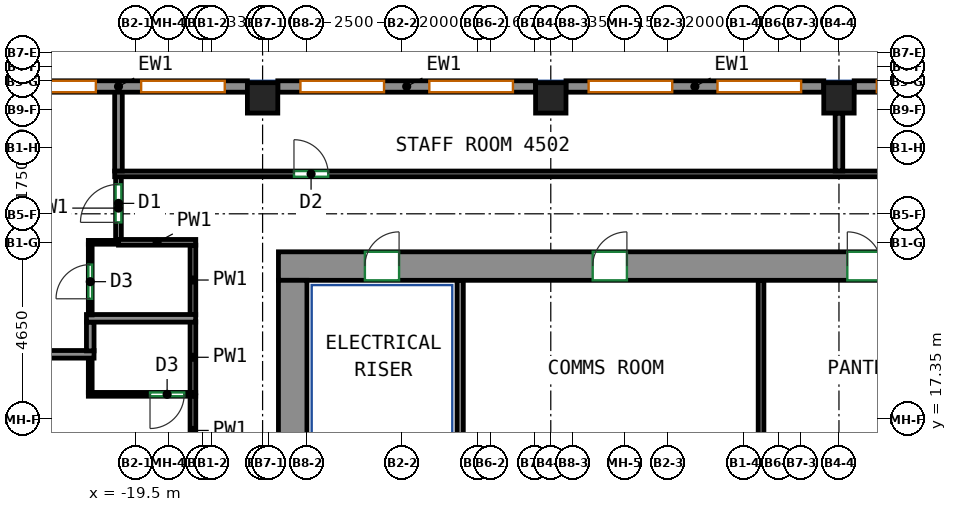
"""IFC4 building model, lengths in metres.
Left out: names, types, materials, properties, quantities, classifications, styles, units other than length and angle.
Written with IfcOpenShell. Run it as: python <this file> out.ifc"""

import sys

from ifc_helpers import new_model, si_unit, direction, frame, frame_2d, origin, origin_2d, place, context, subcontext, project, spatial, rectangle, extrude, source, transform, mapped, element, fill, save


model = new_model("IFC4")
c1 = context("Model", 3, precision=1e-05, world=origin(), true_north=direction((0.0, 1.0)))
c2 = subcontext(c1, "Body", "Model", "MODEL_VIEW")
j1 = project(units=[si_unit("LENGTHUNIT", "METRE"), si_unit("PLANEANGLEUNIT", "RADIAN")], contexts=[c1])
p1 = place(None, origin())
s1 = spatial("IfcSite", under=j1, at=p1, CompositionType="ELEMENT")
p2 = place(p1, origin())
s2 = spatial("IfcBuilding", under=s1, at=p2, CompositionType="ELEMENT")
p3 = place(p2, frame((0.0, 0.0, 188.9)))
s3 = spatial("IfcBuildingStorey", under=s2, at=p3, CompositionType="ELEMENT", Elevation=188.9)
m1 = source(origin(), c2, "Body", "SweptSolid", [
    extrude(rectangle(XDim=0.8, YDim=0.8, at=origin_2d()), origin(), (0.0, 0.0, 1.0), 3.12),
])
for number, where, z_axis, x_axis in (
    (1, (-16.167, 25.8, 0.0), (0.0, 0.0, 1.0), (1.0, 0.0, 0.0)),
    (2, (-8.583, 25.8, 0.0), (0.0, 0.0, 1.0), (1.0, 0.0, 0.0)),
    (3, (-1.0, 25.8, 0.0), (0.0, 0.0, 1.0), (1.0, 0.0, 0.0)),
):
    element("IfcColumn", number, at=place(p3, frame(where, z_axis=z_axis, x_axis=x_axis)), inside=s3, PredefinedType="COLUMN", context=c2, shape_type="MappedRepresentation", body=[
        mapped(m1, transform((0.0, 0.0, 0.0))),
    ])
m2 = source(origin(), c2, "Body", "SweptSolid", [
    extrude(rectangle(XDim=33.6, YDim=0.75, at=frame_2d((16.8, 0.0))), origin(), (0.0, 0.0, 1.0), 3.12),
])
p4 = place(p3, frame((-15.75, 21.375, 0.0), z_axis=(0.0, 0.0, 1.0), x_axis=(1.0, 0.0, 0.0)))
e4 = element("IfcWall", 4, at=p4, inside=s3, PredefinedType="SHEAR", context=c2, shape_type="MappedRepresentation", body=[
    mapped(m2, transform((0.0, 0.0, 0.0))),
])
p5 = place(p4, frame((8.27, 0.0, 0.0)))
e5 = element("IfcOpeningElement", 5, at=p5, cuts=e4, PredefinedType="OPENING", context=c2, shape_type="SweptSolid", body=[
    extrude(rectangle(XDim=0.9, YDim=2.1, at=frame_2d((0.45, 1.05))), frame((0.0, 0.385, 0.0), z_axis=(0.0, -1.0, 0.0), x_axis=(1.0, 0.0, 0.0)), (0.0, 0.0, 1.0), 0.77),
])
p6 = place(p4, frame((14.97, 0.0, 0.0)))
e6 = element("IfcOpeningElement", 6, at=p6, cuts=e4, PredefinedType="OPENING", context=c2, shape_type="SweptSolid", body=[
    extrude(rectangle(XDim=0.9, YDim=2.1, at=frame_2d((0.45, 1.05))), frame((0.0, 0.385, 0.0), z_axis=(0.0, -1.0, 0.0), x_axis=(1.0, 0.0, 0.0)), (0.0, 0.0, 1.0), 0.77),
])
p7 = place(p4, frame((19.794, 0.0, 0.0)))
e7 = element("IfcOpeningElement", 7, at=p7, cuts=e4, PredefinedType="OPENING", context=c2, shape_type="SweptSolid", body=[
    extrude(rectangle(XDim=0.9, YDim=2.1, at=frame_2d((0.45, 1.05))), frame((0.0, 0.385, 0.0), z_axis=(0.0, -1.0, 0.0), x_axis=(1.0, 0.0, 0.0)), (0.0, 0.0, 1.0), 0.77),
])
p8 = place(p4, frame((25.154, 0.0, 0.0)))
e8 = element("IfcOpeningElement", 8, at=p8, cuts=e4, PredefinedType="OPENING", context=c2, shape_type="SweptSolid", body=[
    extrude(rectangle(XDim=0.9, YDim=2.1, at=frame_2d((0.45, 1.05))), frame((0.0, 0.385, 0.0), z_axis=(0.0, -1.0, 0.0), x_axis=(1.0, 0.0, 0.0)), (0.0, 0.0, 1.0), 0.77),
])
p9 = place(p4, frame((2.275, 0.0, 0.0)))
e9 = element("IfcOpeningElement", 9, at=p9, cuts=e4, PredefinedType="OPENING", context=c2, shape_type="SweptSolid", body=[
    extrude(rectangle(XDim=0.9, YDim=2.1, at=frame_2d((0.45, 1.05))), frame((0.0, 0.385, 0.0), z_axis=(0.0, -1.0, 0.0), x_axis=(1.0, 0.0, 0.0)), (0.0, 0.0, 1.0), 0.77),
])
p10 = place(p4, frame((30.425, 0.0, 0.0)))
e10 = element("IfcOpeningElement", 10, at=p10, cuts=e4, PredefinedType="OPENING", context=c2, shape_type="SweptSolid", body=[
    extrude(rectangle(XDim=0.9, YDim=2.1, at=frame_2d((0.45, 1.05))), frame((0.0, 0.385, 0.0), z_axis=(0.0, -1.0, 0.0), x_axis=(1.0, 0.0, 0.0)), (0.0, 0.0, 1.0), 0.77),
])
m3 = source(origin(), c2, "Body", "SweptSolid", [
    extrude(rectangle(XDim=12.0, YDim=0.75, at=frame_2d((6.0, 0.0))), origin(), (0.0, 0.0, 1.0), 3.12),
])
p11 = place(p3, frame((-15.375, 9.0, 0.0), z_axis=(0.0, 0.0, 1.0), x_axis=(0.0, 1.0, 0.0)))
e11 = element("IfcWall", 11, at=p11, inside=s3, PredefinedType="SHEAR", context=c2, shape_type="MappedRepresentation", body=[
    mapped(m3, transform((0.0, 0.0, 0.0))),
])
m4 = source(origin(), c2, "Body", "SweptSolid", [
    extrude(rectangle(XDim=6.783, YDim=0.3, at=frame_2d((3.392, 0.0))), origin(), (0.0, 0.0, 1.0), 3.12),
])
p12 = place(p3, frame((6.183, 26.1, 0.0), z_axis=(0.0, 0.0, 1.0), x_axis=(-1.0, 0.0, 0.0)))
e12 = element("IfcWall", 12, at=p12, inside=s3, PredefinedType="SOLIDWALL", context=c2, shape_type="MappedRepresentation", body=[
    mapped(m4, transform((0.0, 0.0, 0.0))),
])
p13 = place(p12, frame((0.596, 0.0, 0.85)))
e13 = element("IfcOpeningElement", 13, at=p13, cuts=e12, PredefinedType="OPENING", context=c2, shape_type="SweptSolid", body=[
    extrude(rectangle(XDim=2.2, YDim=1.95, at=frame_2d((1.1, 0.975))), frame((0.0, 0.16, 0.0), z_axis=(0.0, -1.0, 0.0), x_axis=(1.0, 0.0, 0.0)), (0.0, 0.0, 1.0), 0.32),
])
p14 = place(p12, frame((3.988, 0.0, 0.85)))
e14 = element("IfcOpeningElement", 14, at=p14, cuts=e12, PredefinedType="OPENING", context=c2, shape_type="SweptSolid", body=[
    extrude(rectangle(XDim=2.2, YDim=1.95, at=frame_2d((1.1, 0.975))), frame((0.0, 0.16, 0.0), z_axis=(0.0, -1.0, 0.0), x_axis=(1.0, 0.0, 0.0)), (0.0, 0.0, 1.0), 0.32),
])
p15 = place(p3, frame((-1.4, 26.1, 0.0), z_axis=(0.0, 0.0, 1.0), x_axis=(-1.0, 0.0, 0.0)))
e15 = element("IfcWall", 15, at=p15, inside=s3, PredefinedType="SOLIDWALL", context=c2, shape_type="MappedRepresentation", body=[
    mapped(m4, transform((0.0, 0.0, 0.0))),
])
p16 = place(p15, frame((0.596, 0.0, 0.85)))
e16 = element("IfcOpeningElement", 16, at=p16, cuts=e15, PredefinedType="OPENING", context=c2, shape_type="SweptSolid", body=[
    extrude(rectangle(XDim=2.2, YDim=1.95, at=frame_2d((1.1, 0.975))), frame((0.0, 0.16, 0.0), z_axis=(0.0, -1.0, 0.0), x_axis=(1.0, 0.0, 0.0)), (0.0, 0.0, 1.0), 0.32),
])
p17 = place(p15, frame((3.988, 0.0, 0.85)))
e17 = element("IfcOpeningElement", 17, at=p17, cuts=e15, PredefinedType="OPENING", context=c2, shape_type="SweptSolid", body=[
    extrude(rectangle(XDim=2.2, YDim=1.95, at=frame_2d((1.1, 0.975))), frame((0.0, 0.16, 0.0), z_axis=(0.0, -1.0, 0.0), x_axis=(1.0, 0.0, 0.0)), (0.0, 0.0, 1.0), 0.32),
])
m5 = source(origin(), c2, "Body", "SweptSolid", [
    extrude(rectangle(XDim=6.783, YDim=0.3, at=frame_2d((3.392, 0.0))), origin(), (0.0, 0.0, 1.0), 3.12),
])
p18 = place(p3, frame((-8.983, 26.1, 0.0), z_axis=(0.0, 0.0, 1.0), x_axis=(-1.0, 0.0, 0.0)))
e18 = element("IfcWall", 18, at=p18, inside=s3, PredefinedType="SOLIDWALL", context=c2, shape_type="MappedRepresentation", body=[
    mapped(m5, transform((0.0, 0.0, 0.0))),
])
p19 = place(p18, frame((0.596, 0.0, 0.85)))
e19 = element("IfcOpeningElement", 19, at=p19, cuts=e18, PredefinedType="OPENING", context=c2, shape_type="SweptSolid", body=[
    extrude(rectangle(XDim=2.2, YDim=1.95, at=frame_2d((1.1, 0.975))), frame((0.0, 0.16, 0.0), z_axis=(0.0, -1.0, 0.0), x_axis=(1.0, 0.0, 0.0)), (0.0, 0.0, 1.0), 0.32),
])
p20 = place(p18, frame((3.988, 0.0, 0.85)))
e20 = element("IfcOpeningElement", 20, at=p20, cuts=e18, PredefinedType="OPENING", context=c2, shape_type="SweptSolid", body=[
    extrude(rectangle(XDim=2.2, YDim=1.95, at=frame_2d((1.1, 0.975))), frame((0.0, 0.16, 0.0), z_axis=(0.0, -1.0, 0.0), x_axis=(1.0, 0.0, 0.0)), (0.0, 0.0, 1.0), 0.32),
])
p21 = place(p3, frame((-16.567, 26.1, 0.0), z_axis=(0.0, 0.0, 1.0), x_axis=(-1.0, 0.0, 0.0)))
e21 = element("IfcWall", 21, at=p21, inside=s3, PredefinedType="SOLIDWALL", context=c2, shape_type="MappedRepresentation", body=[
    mapped(m4, transform((0.0, 0.0, 0.0))),
])
p22 = place(p21, frame((0.596, 0.0, 0.85)))
e22 = element("IfcOpeningElement", 22, at=p22, cuts=e21, PredefinedType="OPENING", context=c2, shape_type="SweptSolid", body=[
    extrude(rectangle(XDim=2.2, YDim=1.95, at=frame_2d((1.1, 0.975))), frame((0.0, 0.16, 0.0), z_axis=(0.0, -1.0, 0.0), x_axis=(1.0, 0.0, 0.0)), (0.0, 0.0, 1.0), 0.32),
])
p23 = place(p21, frame((3.988, 0.0, 0.85)))
e23 = element("IfcOpeningElement", 23, at=p23, cuts=e21, PredefinedType="OPENING", context=c2, shape_type="SweptSolid", body=[
    extrude(rectangle(XDim=2.2, YDim=1.95, at=frame_2d((1.1, 0.975))), frame((0.0, 0.16, 0.0), z_axis=(0.0, -1.0, 0.0), x_axis=(1.0, 0.0, 0.0)), (0.0, 0.0, 1.0), 0.32),
])
m6 = source(origin(), c2, "Body", "SweptSolid", [
    extrude(rectangle(XDim=4.8, YDim=0.165, at=frame_2d((2.4, 0.0))), origin(), (0.0, 0.0, 1.0), 3.12),
])
p24 = place(p3, frame((-10.968, 16.2, 0.0), z_axis=(0.0, 0.0, 1.0), x_axis=(0.0, 1.0, 0.0)))
e24 = element("IfcWall", 24, at=p24, inside=s3, PredefinedType="PARTITIONING", context=c2, shape_type="MappedRepresentation", body=[
    mapped(m6, transform((0.0, 0.0, 0.0))),
])
m7 = source(origin(), c2, "Body", "SweptSolid", [
    extrude(rectangle(XDim=4.8, YDim=0.15, at=frame_2d((2.4, 0.0))), origin(), (0.0, 0.0, 1.0), 3.12),
])
p25 = place(p3, frame((-3.05, 16.2, 0.0), z_axis=(0.0, 0.0, 1.0), x_axis=(0.0, 1.0, 0.0)))
e25 = element("IfcWall", 25, at=p25, inside=s3, PredefinedType="PARTITIONING", context=c2, shape_type="MappedRepresentation", body=[
    mapped(m7, transform((0.0, 0.0, 0.0))),
])
p26 = place(p3, frame((-18.0, 14.927, 0.0), z_axis=(0.0, 0.0, 1.0), x_axis=(0.0, 1.0, 0.0)))
e26 = element("IfcWall", 26, at=p26, inside=s3, PredefinedType="PARTITIONING", context=c2, shape_type="SweptSolid", body=[
    extrude(rectangle(XDim=3.033, YDim=0.15, at=frame_2d((1.517, 0.0))), origin(), (0.0, 0.0, 1.0), 3.12),
])
p27 = place(p26, frame((0.404, 0.0, 0.0)))
e27 = element("IfcOpeningElement", 27, at=p27, cuts=e26, PredefinedType="OPENING", context=c2, shape_type="SweptSolid", body=[
    extrude(rectangle(XDim=1.0, YDim=2.1, at=frame_2d((0.5, 1.05))), frame((0.0, 0.085, 0.0), z_axis=(0.0, -1.0, 0.0), x_axis=(1.0, 0.0, 0.0)), (0.0, 0.0, 1.0), 0.17),
])
p28 = place(p3, frame((-18.0, 18.04, 0.0), z_axis=(0.0, 0.0, 1.0), x_axis=(0.0, 1.0, 0.0)))
e28 = element("IfcWall", 28, at=p28, inside=s3, PredefinedType="PARTITIONING", context=c2, shape_type="SweptSolid", body=[
    extrude(rectangle(XDim=1.87, YDim=0.15, at=frame_2d((0.935, 0.0))), origin(), (0.0, 0.0, 1.0), 3.12),
])
p29 = place(p3, frame((-19.959, 22.075, 0.0), z_axis=(0.0, 0.0, 1.0), x_axis=(0.0, 1.0, 0.0)))
e29 = element("IfcWall", 29, at=p29, inside=s3, PredefinedType="PARTITIONING", context=c2, shape_type="SweptSolid", body=[
    extrude(rectangle(XDim=1.65, YDim=0.15, at=frame_2d((0.825, 0.0))), origin(), (0.0, 0.0, 1.0), 3.12),
])
p30 = place(p29, frame((0.45, 0.0, 0.0)))
e30 = element("IfcOpeningElement", 30, at=p30, cuts=e29, PredefinedType="OPENING", context=c2, shape_type="SweptSolid", body=[
    extrude(rectangle(XDim=1.0, YDim=2.1, at=frame_2d((0.5, 1.05))), frame((0.0, 0.085, 0.0), z_axis=(0.0, -1.0, 0.0), x_axis=(1.0, 0.0, 0.0)), (0.0, 0.0, 1.0), 0.17),
])
p31 = place(p3, frame((-18.0, 20.09, 0.0), z_axis=(0.0, 0.0, 1.0), x_axis=(0.0, 1.0, 0.0)))
e31 = element("IfcWall", 31, at=p31, inside=s3, PredefinedType="PARTITIONING", context=c2, shape_type="SweptSolid", body=[
    extrude(rectangle(XDim=1.835, YDim=0.15, at=frame_2d((0.917, 0.0))), origin(), (0.0, 0.0, 1.0), 3.12),
])
p32 = place(p3, frame((-19.959, 22.0, 0.0), z_axis=(0.0, 0.0, 1.0), x_axis=(1.0, 0.0, 0.0)))
e32 = element("IfcWall", 32, at=p32, inside=s3, PredefinedType="PARTITIONING", context=c2, shape_type="SweptSolid", body=[
    extrude(rectangle(XDim=2.034, YDim=0.15, at=frame_2d((1.017, 0.0))), origin(), (0.0, 0.0, 1.0), 3.12),
])
p33 = place(p3, frame((-20.059, 23.8, 0.0), z_axis=(0.0, 0.0, 1.0), x_axis=(1.0, 0.0, 0.0)))
e33 = element("IfcWall", 33, at=p33, inside=s3, PredefinedType="PARTITIONING", context=c2, shape_type="SweptSolid", body=[
    extrude(rectangle(XDim=41.909, YDim=0.15, at=frame_2d((20.955, 0.0))), origin(), (0.0, 0.0, 1.0), 3.12),
])
p34 = place(p33, frame((4.718, 0.0, 0.0)))
e34 = element("IfcOpeningElement", 34, at=p34, cuts=e33, PredefinedType="OPENING", context=c2, shape_type="SweptSolid", body=[
    extrude(rectangle(XDim=0.9, YDim=2.1, at=frame_2d((0.45, 1.05))), frame((0.0, 0.085, 0.0), z_axis=(0.0, -1.0, 0.0), x_axis=(1.0, 0.0, 0.0)), (0.0, 0.0, 1.0), 0.17),
])
p35 = place(p33, frame((30.079, 0.0, 0.0)))
e35 = element("IfcOpeningElement", 35, at=p35, cuts=e33, PredefinedType="OPENING", context=c2, shape_type="SweptSolid", body=[
    extrude(rectangle(XDim=1.0, YDim=2.1, at=frame_2d((0.5, 1.05))), frame((0.0, 0.085, 0.0), z_axis=(0.0, -1.0, 0.0), x_axis=(1.0, 0.0, 0.0)), (0.0, 0.0, 1.0), 0.17),
])
p36 = place(p3, frame((-17.927, 18.0, 0.0), z_axis=(0.0, 0.0, 1.0), x_axis=(-1.0, 0.0, 0.0)))
e36 = element("IfcWall", 36, at=p36, inside=s3, PredefinedType="PARTITIONING", context=c2, shape_type="SweptSolid", body=[
    extrude(rectangle(XDim=2.825, YDim=0.1, at=frame_2d((1.413, 0.0))), origin(), (0.0, 0.0, 1.0), 3.12),
])
p37 = place(p36, frame((0.302, 0.0, 0.0)))
e37 = element("IfcOpeningElement", 37, at=p37, cuts=e36, PredefinedType="OPENING", context=c2, shape_type="SweptSolid", body=[
    extrude(rectangle(XDim=0.9, YDim=2.1, at=frame_2d((0.45, 1.05))), frame((0.0, 0.06, 0.0), z_axis=(0.0, -1.0, 0.0), x_axis=(1.0, 0.0, 0.0)), (0.0, 0.0, 1.0), 0.12),
])
p38 = place(p3, frame((-20.702, 18.05, 0.0), z_axis=(0.0, 0.0, 1.0), x_axis=(0.0, 1.0, 0.0)))
e38 = element("IfcWall", 38, at=p38, inside=s3, PredefinedType="PARTITIONING", context=c2, shape_type="SweptSolid", body=[
    extrude(rectangle(XDim=0.903, YDim=0.1, at=frame_2d((0.451, 0.0))), origin(), (0.0, 0.0, 1.0), 3.12),
])
p39 = place(p3, frame((-20.602, 19.053, 0.0), z_axis=(0.0, 0.0, 1.0), x_axis=(-1.0, 0.0, 0.0)))
e39 = element("IfcWall", 39, at=p39, inside=s3, PredefinedType="PARTITIONING", context=c2, shape_type="SweptSolid", body=[
    extrude(rectangle(XDim=6.398, YDim=0.2, at=frame_2d((3.199, 0.0))), origin(), (0.0, 0.0, 1.0), 3.12),
])
p40 = place(p3, frame((-20.702, 19.9, 0.0), z_axis=(0.0, 0.0, 1.0), x_axis=(0.0, -1.0, 0.0)))
e40 = element("IfcWall", 40, at=p40, inside=s3, PredefinedType="PARTITIONING", context=c2, shape_type="SweptSolid", body=[
    extrude(rectangle(XDim=0.757, YDim=0.2, at=frame_2d((0.378, 0.0))), origin(), (0.0, 0.0, 1.0), 3.12),
])
p41 = place(p3, frame((-17.927, 20.0, 0.0), z_axis=(0.0, 0.0, 1.0), x_axis=(-1.0, 0.0, 0.0)))
e41 = element("IfcWall", 41, at=p41, inside=s3, PredefinedType="PARTITIONING", context=c2, shape_type="SweptSolid", body=[
    extrude(rectangle(XDim=2.875, YDim=0.2, at=frame_2d((1.438, 0.0))), origin(), (0.0, 0.0, 1.0), 3.12),
])
p42 = place(p3, frame((-20.752, 22.0, 0.0), z_axis=(0.0, 0.0, 1.0), x_axis=(1.0, 0.0, 0.0)))
e42 = element("IfcWall", 42, at=p42, inside=s3, PredefinedType="PARTITIONING", context=c2, shape_type="SweptSolid", body=[
    extrude(rectangle(XDim=0.791, YDim=0.1, at=frame_2d((0.396, 0.0))), origin(), (0.0, 0.0, 1.0), 3.12),
])
p43 = place(p3, frame((-20.702, 20.09, 0.0), z_axis=(0.0, 0.0, 1.0), x_axis=(0.0, 1.0, 0.0)))
e43 = element("IfcWall", 43, at=p43, inside=s3, PredefinedType="PARTITIONING", context=c2, shape_type="SweptSolid", body=[
    extrude(rectangle(XDim=1.86, YDim=0.1, at=frame_2d((0.93, 0.0))), origin(), (0.0, 0.0, 1.0), 3.12),
])
p44 = place(p43, frame((0.424, 0.0, 0.0)))
e44 = element("IfcOpeningElement", 44, at=p44, cuts=e43, PredefinedType="OPENING", context=c2, shape_type="SweptSolid", body=[
    extrude(rectangle(XDim=0.9, YDim=2.1, at=frame_2d((0.45, 1.05))), frame((0.0, 0.06, 0.0), z_axis=(0.0, -1.0, 0.0), x_axis=(1.0, 0.0, 0.0)), (0.0, 0.0, 1.0), 0.12),
])
p45 = place(p3, frame((-19.959, 23.877, 0.0), z_axis=(0.0, 0.0, 1.0), x_axis=(0.0, 1.0, 0.0)))
e45 = element("IfcWall", 45, at=p45, inside=s3, PredefinedType="PARTITIONING", context=c2, shape_type="SweptSolid", body=[
    extrude(rectangle(XDim=2.123, YDim=0.2, at=frame_2d((1.062, 0.0))), origin(), (0.0, 0.0, 1.0), 3.12),
])
p46 = place(p3, frame((-1.0, 23.877, 0.0), z_axis=(0.0, 0.0, 1.0), x_axis=(0.0, 1.0, 0.0)))
e46 = element("IfcWall", 46, at=p46, inside=s3, PredefinedType="PARTITIONING", context=c2, shape_type="SweptSolid", body=[
    extrude(rectangle(XDim=1.523, YDim=0.2, at=frame_2d((0.761, 0.0))), origin(), (0.0, 0.0, 1.0), 3.12),
])
p47 = place(p14, origin())
e47 = element("IfcWindow", 47, at=p47, inside=s3, PartitioningType="SINGLE_PANEL", PredefinedType="WINDOW", context=c2, shape_type="SweptSolid", body=[
    extrude(rectangle(XDim=2.2, YDim=1.95, at=frame_2d((1.1, 0.975))), frame((0.0, 0.03, 0.0), z_axis=(0.0, -1.0, 0.0), x_axis=(1.0, 0.0, 0.0)), (0.0, 0.0, 1.0), 0.06),
])
fill(e14, e47)
p48 = place(p16, origin())
e48 = element("IfcWindow", 48, at=p48, inside=s3, PartitioningType="SINGLE_PANEL", PredefinedType="WINDOW", context=c2, shape_type="SweptSolid", body=[
    extrude(rectangle(XDim=2.2, YDim=1.95, at=frame_2d((1.1, 0.975))), frame((0.0, 0.03, 0.0), z_axis=(0.0, -1.0, 0.0), x_axis=(1.0, 0.0, 0.0)), (0.0, 0.0, 1.0), 0.06),
])
fill(e16, e48)
p49 = place(p17, origin())
e49 = element("IfcWindow", 49, at=p49, inside=s3, PartitioningType="SINGLE_PANEL", PredefinedType="WINDOW", context=c2, shape_type="SweptSolid", body=[
    extrude(rectangle(XDim=2.2, YDim=1.95, at=frame_2d((1.1, 0.975))), frame((0.0, 0.03, 0.0), z_axis=(0.0, -1.0, 0.0), x_axis=(1.0, 0.0, 0.0)), (0.0, 0.0, 1.0), 0.06),
])
fill(e17, e49)
p50 = place(p19, origin())
e50 = element("IfcWindow", 50, at=p50, inside=s3, PartitioningType="SINGLE_PANEL", PredefinedType="WINDOW", context=c2, shape_type="SweptSolid", body=[
    extrude(rectangle(XDim=2.2, YDim=1.95, at=frame_2d((1.1, 0.975))), frame((0.0, 0.03, 0.0), z_axis=(0.0, -1.0, 0.0), x_axis=(1.0, 0.0, 0.0)), (0.0, 0.0, 1.0), 0.06),
])
fill(e19, e50)
p51 = place(p20, origin())
e51 = element("IfcWindow", 51, at=p51, inside=s3, PartitioningType="SINGLE_PANEL", PredefinedType="WINDOW", context=c2, shape_type="SweptSolid", body=[
    extrude(rectangle(XDim=2.2, YDim=1.95, at=frame_2d((1.1, 0.975))), frame((0.0, 0.03, 0.0), z_axis=(0.0, -1.0, 0.0), x_axis=(1.0, 0.0, 0.0)), (0.0, 0.0, 1.0), 0.06),
])
fill(e20, e51)
p52 = place(p22, origin())
e52 = element("IfcWindow", 52, at=p52, inside=s3, PartitioningType="SINGLE_PANEL", PredefinedType="WINDOW", context=c2, shape_type="SweptSolid", body=[
    extrude(rectangle(XDim=2.2, YDim=1.95, at=frame_2d((1.1, 0.975))), frame((0.0, 0.03, 0.0), z_axis=(0.0, -1.0, 0.0), x_axis=(1.0, 0.0, 0.0)), (0.0, 0.0, 1.0), 0.06),
])
fill(e22, e52)
p53 = place(p23, origin())
e53 = element("IfcWindow", 53, at=p53, inside=s3, PartitioningType="SINGLE_PANEL", PredefinedType="WINDOW", context=c2, shape_type="SweptSolid", body=[
    extrude(rectangle(XDim=2.2, YDim=1.95, at=frame_2d((1.1, 0.975))), frame((0.0, 0.03, 0.0), z_axis=(0.0, -1.0, 0.0), x_axis=(1.0, 0.0, 0.0)), (0.0, 0.0, 1.0), 0.06),
])
fill(e23, e53)
p54 = place(p5, origin())
e54 = element("IfcDoor", 54, at=p54, inside=s3, OperationType="SINGLE_SWING_RIGHT", PredefinedType="DOOR", context=c2, shape_type="SweptSolid", body=[
    extrude(rectangle(XDim=0.9, YDim=2.1, at=frame_2d((0.45, 1.05))), frame((0.0, -0.23, 0.0), z_axis=(0.0, -1.0, 0.0), x_axis=(1.0, 0.0, 0.0)), (0.0, 0.0, 1.0), 0.05),
])
fill(e5, e54)
p55 = place(p6, origin())
e55 = element("IfcDoor", 55, at=p55, inside=s3, OperationType="SINGLE_SWING_LEFT", PredefinedType="DOOR", context=c2, shape_type="SweptSolid", body=[
    extrude(rectangle(XDim=0.9, YDim=2.1, at=frame_2d((0.45, 1.05))), frame((0.0, -0.23, 0.0), z_axis=(0.0, -1.0, 0.0), x_axis=(1.0, 0.0, 0.0)), (0.0, 0.0, 1.0), 0.05),
])
fill(e6, e55)
p56 = place(p9, origin())
e56 = element("IfcDoor", 56, at=p56, inside=s3, OperationType="SINGLE_SWING_RIGHT", PredefinedType="DOOR", context=c2, shape_type="SweptSolid", body=[
    extrude(rectangle(XDim=0.9, YDim=2.1, at=frame_2d((0.45, 1.05))), frame((0.0, -0.23, 0.0), z_axis=(0.0, -1.0, 0.0), x_axis=(1.0, 0.0, 0.0)), (0.0, 0.0, 1.0), 0.05),
])
fill(e9, e56)
p57 = place(p37, origin())
e57 = element("IfcDoor", 57, at=p57, inside=s3, OperationType="SINGLE_SWING_RIGHT", PredefinedType="DOOR", context=c2, shape_type="SweptSolid", body=[
    extrude(rectangle(XDim=0.9, YDim=2.1, at=frame_2d((0.45, 1.05))), frame((0.0, 0.025, 0.0), z_axis=(0.0, -1.0, 0.0), x_axis=(1.0, 0.0, 0.0)), (0.0, 0.0, 1.0), 0.05),
])
fill(e37, e57)
p58 = place(p44, origin())
e58 = element("IfcDoor", 58, at=p58, inside=s3, OperationType="SINGLE_SWING_LEFT", PredefinedType="DOOR", context=c2, shape_type="SweptSolid", body=[
    extrude(rectangle(XDim=0.9, YDim=2.1, at=frame_2d((0.45, 1.05))), frame((0.0, 0.025, 0.0), z_axis=(0.0, -1.0, 0.0), x_axis=(1.0, 0.0, 0.0)), (0.0, 0.0, 1.0), 0.05),
])
fill(e44, e58)
p59 = place(p30, origin())
e59 = element("IfcDoor", 59, at=p59, inside=s3, OperationType="SINGLE_SWING_LEFT", PredefinedType="DOOR", context=c2, shape_type="SweptSolid", body=[
    extrude(rectangle(XDim=1.0, YDim=2.1, at=frame_2d((0.5, 1.05))), frame((0.0, 0.025, 0.0), z_axis=(0.0, -1.0, 0.0), x_axis=(1.0, 0.0, 0.0)), (0.0, 0.0, 1.0), 0.05),
])
fill(e30, e59)
p60 = place(p34, origin())
e60 = element("IfcDoor", 60, at=p60, inside=s3, OperationType="SINGLE_SWING_LEFT", PredefinedType="DOOR", context=c2, shape_type="SweptSolid", body=[
    extrude(rectangle(XDim=0.9, YDim=2.1, at=frame_2d((0.45, 1.05))), frame((0.0, 0.025, 0.0), z_axis=(0.0, -1.0, 0.0), x_axis=(1.0, 0.0, 0.0)), (0.0, 0.0, 1.0), 0.05),
])
fill(e34, e60)
save(model, sys.argv[1])
